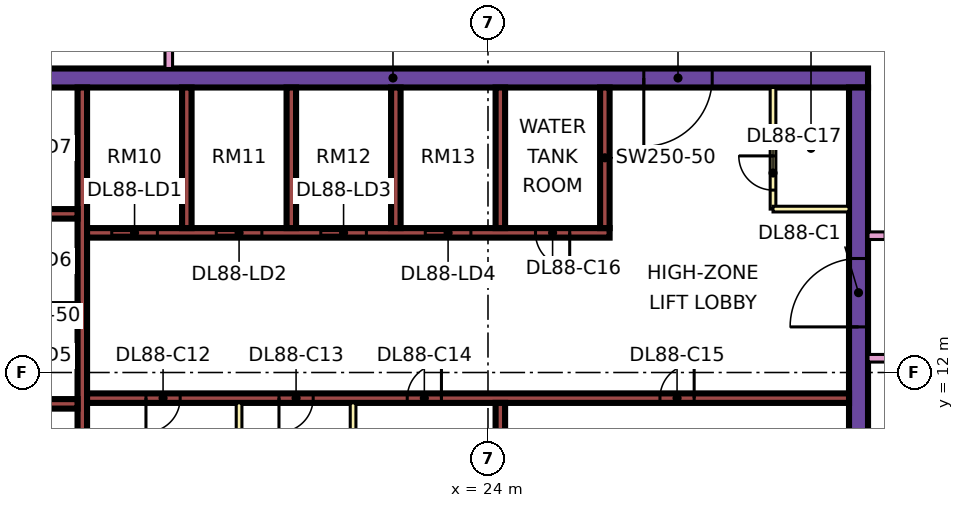
"""IFC4 building model, lengths in metres.
Left out: names, types, materials, properties, quantities, classifications, styles, units other than length and angle.
Written with IfcOpenShell. Run it as: python <this file> out.ifc"""

import sys

from ifc_helpers import new_model, si_unit, direction, frame, frame_2d, origin, place, context, subcontext, project, spatial, rectangle, extrude, element, fill, save


model = new_model("IFC4")
c1 = context("Model", 3, precision=1e-05, world=origin(), true_north=direction((0.0, 1.0)))
c2 = subcontext(c1, "Body", "Model", "MODEL_VIEW")
j1 = project(units=[si_unit("LENGTHUNIT", "METRE"), si_unit("PLANEANGLEUNIT", "RADIAN")], contexts=[c1])
p1 = place(None, origin())
s1 = spatial("IfcSite", under=j1, at=p1, CompositionType="ELEMENT")
p2 = place(p1, origin())
s2 = spatial("IfcBuilding", under=s1, at=p2, CompositionType="ELEMENT")
p3 = place(p2, frame((0.0, 0.0, 376.4)))
s3 = spatial("IfcBuildingStorey", under=s2, at=p3, CompositionType="ELEMENT", Elevation=376.4)
p4 = place(p3, frame((9.0, 19.75, 0.0), z_axis=(0.0, 0.0, 1.0), x_axis=(1.0, 0.0, 0.0)))
e1 = element("IfcWall", 1, at=p4, inside=s3, PredefinedType="SHEAR", context=c2, shape_type="SweptSolid", body=[
    extrude(rectangle(XDim=25.0, YDim=0.5, at=frame_2d((12.5, 0.0))), origin(), (0.0, 0.0, 1.0), 3.75),
])
p5 = place(p4, frame((19.1, 0.0, 0.0)))
e2 = element("IfcOpeningElement", 2, at=p5, cuts=e1, PredefinedType="OPENING", context=c2, shape_type="SweptSolid", body=[
    extrude(rectangle(XDim=1.8, YDim=2.4, at=frame_2d((0.9, 1.2))), frame((0.0, 0.26, 0.0), z_axis=(0.0, -1.0, 0.0), x_axis=(1.0, 0.0, 0.0)), (0.0, 0.0, 1.0), 0.52),
])
p6 = place(p3, frame((33.75, 7.5, 0.0), z_axis=(0.0, 0.0, 1.0), x_axis=(0.0, 1.0, 0.0)))
e3 = element("IfcWall", 3, at=p6, inside=s3, PredefinedType="SHEAR", context=c2, shape_type="SweptSolid", body=[
    extrude(rectangle(XDim=12.0, YDim=0.5, at=frame_2d((6.0, 0.0))), origin(), (0.0, 0.0, 1.0), 3.75),
])
p7 = place(p6, frame((5.7, 0.0, 0.0)))
e4 = element("IfcOpeningElement", 4, at=p7, cuts=e3, PredefinedType="OPENING", context=c2, shape_type="SweptSolid", body=[
    extrude(rectangle(XDim=1.8, YDim=2.4, at=frame_2d((0.9, 1.2))), frame((0.0, 0.26, 0.0), z_axis=(0.0, -1.0, 0.0), x_axis=(1.0, 0.0, 0.0)), (0.0, 0.0, 1.0), 0.52),
])
p8 = place(p3, frame((13.325, 7.5, 0.0), z_axis=(0.0, 0.0, 1.0), x_axis=(0.0, 1.0, 0.0)))
e5 = element("IfcWall", 5, at=p8, inside=s3, PredefinedType="SHEAR", context=c2, shape_type="SweptSolid", body=[
    extrude(rectangle(XDim=12.0, YDim=0.25, at=frame_2d((6.0, 0.0))), origin(), (0.0, 0.0, 1.0), 3.75),
])
p9 = place(p3, frame((13.45, 11.325, 0.0), z_axis=(0.0, 0.0, 1.0), x_axis=(1.0, 0.0, 0.0)))
e6 = element("IfcWall", 6, at=p9, inside=s3, PredefinedType="SHEAR", context=c2, shape_type="SweptSolid", body=[
    extrude(rectangle(XDim=20.05, YDim=0.25, at=frame_2d((10.025, 0.0))), origin(), (0.0, 0.0, 1.0), 3.75),
])
p10 = place(p9, frame((1.55, 0.0, 0.0)))
e7 = element("IfcOpeningElement", 7, at=p10, cuts=e6, PredefinedType="OPENING", context=c2, shape_type="SweptSolid", body=[
    extrude(rectangle(XDim=0.9, YDim=2.1, at=frame_2d((0.45, 1.05))), frame((0.0, 0.135, 0.0), z_axis=(0.0, -1.0, 0.0), x_axis=(1.0, 0.0, 0.0)), (0.0, 0.0, 1.0), 0.27),
])
p11 = place(p9, frame((5.05, 0.0, 0.0)))
e8 = element("IfcOpeningElement", 8, at=p11, cuts=e6, PredefinedType="OPENING", context=c2, shape_type="SweptSolid", body=[
    extrude(rectangle(XDim=0.9, YDim=2.1, at=frame_2d((0.45, 1.05))), frame((0.0, 0.135, 0.0), z_axis=(0.0, -1.0, 0.0), x_axis=(1.0, 0.0, 0.0)), (0.0, 0.0, 1.0), 0.27),
])
p12 = place(p9, frame((8.425, 0.0, 0.0)))
e9 = element("IfcOpeningElement", 9, at=p12, cuts=e6, PredefinedType="OPENING", context=c2, shape_type="SweptSolid", body=[
    extrude(rectangle(XDim=0.9, YDim=2.1, at=frame_2d((0.45, 1.05))), frame((0.0, 0.135, 0.0), z_axis=(0.0, -1.0, 0.0), x_axis=(1.0, 0.0, 0.0)), (0.0, 0.0, 1.0), 0.27),
])
p13 = place(p9, frame((15.075, 0.0, 0.0)))
e10 = element("IfcOpeningElement", 10, at=p13, cuts=e6, PredefinedType="OPENING", context=c2, shape_type="SweptSolid", body=[
    extrude(rectangle(XDim=0.9, YDim=2.1, at=frame_2d((0.45, 1.05))), frame((0.0, 0.135, 0.0), z_axis=(0.0, -1.0, 0.0), x_axis=(1.0, 0.0, 0.0)), (0.0, 0.0, 1.0), 0.27),
])
p14 = place(p3, frame((13.45, 15.675, 0.0), z_axis=(0.0, 0.0, 1.0), x_axis=(1.0, 0.0, 0.0)))
e11 = element("IfcWall", 11, at=p14, inside=s3, PredefinedType="SHEAR", context=c2, shape_type="SweptSolid", body=[
    extrude(rectangle(XDim=13.75, YDim=0.25, at=frame_2d((6.875, 0.0))), origin(), (0.0, 0.0, 1.0), 3.75),
])
p15 = place(p14, frame((0.65, 0.0, 0.0)))
e12 = element("IfcOpeningElement", 12, at=p15, cuts=e11, PredefinedType="OPENING", context=c2, shape_type="SweptSolid", body=[
    extrude(rectangle(XDim=1.2, YDim=2.2, at=frame_2d((0.6, 1.1))), frame((0.0, 0.135, 0.0), z_axis=(0.0, -1.0, 0.0), x_axis=(1.0, 0.0, 0.0)), (0.0, 0.0, 1.0), 0.27),
])
p16 = place(p14, frame((3.4, 0.0, 0.0)))
e13 = element("IfcOpeningElement", 13, at=p16, cuts=e11, PredefinedType="OPENING", context=c2, shape_type="SweptSolid", body=[
    extrude(rectangle(XDim=1.2, YDim=2.2, at=frame_2d((0.6, 1.1))), frame((0.0, 0.135, 0.0), z_axis=(0.0, -1.0, 0.0), x_axis=(1.0, 0.0, 0.0)), (0.0, 0.0, 1.0), 0.27),
])
p17 = place(p14, frame((6.15, 0.0, 0.0)))
e14 = element("IfcOpeningElement", 14, at=p17, cuts=e11, PredefinedType="OPENING", context=c2, shape_type="SweptSolid", body=[
    extrude(rectangle(XDim=1.2, YDim=2.2, at=frame_2d((0.6, 1.1))), frame((0.0, 0.135, 0.0), z_axis=(0.0, -1.0, 0.0), x_axis=(1.0, 0.0, 0.0)), (0.0, 0.0, 1.0), 0.27),
])
p18 = place(p14, frame((8.9, 0.0, 0.0)))
e15 = element("IfcOpeningElement", 15, at=p18, cuts=e11, PredefinedType="OPENING", context=c2, shape_type="SweptSolid", body=[
    extrude(rectangle(XDim=1.2, YDim=2.2, at=frame_2d((0.6, 1.1))), frame((0.0, 0.135, 0.0), z_axis=(0.0, -1.0, 0.0), x_axis=(1.0, 0.0, 0.0)), (0.0, 0.0, 1.0), 0.27),
])
p19 = place(p14, frame((11.8, 0.0, 0.0)))
e16 = element("IfcOpeningElement", 16, at=p19, cuts=e11, PredefinedType="OPENING", context=c2, shape_type="SweptSolid", body=[
    extrude(rectangle(XDim=0.9, YDim=2.1, at=frame_2d((0.45, 1.05))), frame((0.0, 0.135, 0.0), z_axis=(0.0, -1.0, 0.0), x_axis=(1.0, 0.0, 0.0)), (0.0, 0.0, 1.0), 0.27),
])
for number, where, z_axis, x_axis in (
    (17, (10.2, 11.175, 0.0), (0.0, 0.0, 1.0), (1.0, 0.0, 0.0)),
    (18, (10.2, 13.675, 0.0), (0.0, 0.0, 1.0), (1.0, 0.0, 0.0)),
    (19, (10.2, 16.175, 0.0), (0.0, 0.0, 1.0), (1.0, 0.0, 0.0)),
):
    element("IfcWall", number, at=place(p3, frame(where, z_axis=z_axis, x_axis=x_axis)), inside=s3, PredefinedType="SHEAR", context=c2, shape_type="SweptSolid", body=[
        extrude(rectangle(XDim=3.0, YDim=0.25, at=frame_2d((1.5, 0.0))), origin(), (0.0, 0.0, 1.0), 3.75),
    ])
for number, where, z_axis, x_axis in (
    (20, (24.325, 7.5, 0.0), (0.0, 0.0, 1.0), (0.0, 1.0, 0.0)),
    (21, (16.075, 15.8, 0.0), (0.0, 0.0, 1.0), (0.0, 1.0, 0.0)),
    (22, (18.825, 15.8, 0.0), (0.0, 0.0, 1.0), (0.0, 1.0, 0.0)),
    (23, (21.575, 15.8, 0.0), (0.0, 0.0, 1.0), (0.0, 1.0, 0.0)),
    (24, (24.325, 15.8, 0.0), (0.0, 0.0, 1.0), (0.0, 1.0, 0.0)),
    (25, (27.075, 15.8, 0.0), (0.0, 0.0, 1.0), (0.0, 1.0, 0.0)),
):
    element("IfcWall", number, at=place(p3, frame(where, z_axis=z_axis, x_axis=x_axis)), inside=s3, PredefinedType="SHEAR", context=c2, shape_type="SweptSolid", body=[
        extrude(rectangle(XDim=3.7, YDim=0.25, at=frame_2d((1.85, 0.0))), origin(), (0.0, 0.0, 1.0), 3.75),
    ])
p20 = place(p3, frame((-1.447, 12.553, 0.0), z_axis=(0.0, 0.0, 1.0), x_axis=(0.707106781187, -0.707106781187, 0.0)))
e26 = element("IfcWall", 26, at=p20, inside=s3, PredefinedType="SOLIDWALL", context=c2, shape_type="SweptSolid", body=[
    extrude(rectangle(XDim=19.799, YDim=0.15, at=frame_2d((9.899, 0.0))), origin(), (0.0, 0.0, 1.0), 3.35),
])
p21 = place(p20, frame((2.212, 0.0, 0.45)))
e27 = element("IfcOpeningElement", 27, at=p21, cuts=e26, PredefinedType="OPENING", context=c2, shape_type="SweptSolid", body=[
    extrude(rectangle(XDim=3.0, YDim=2.4, at=frame_2d((1.5, 1.2))), frame((0.0, 0.085, 0.0), z_axis=(0.0, -1.0, 0.0), x_axis=(1.0, 0.0, 0.0)), (0.0, 0.0, 1.0), 0.17),
])
p22 = place(p20, frame((10.216, 0.0, 0.45)))
e28 = element("IfcOpeningElement", 28, at=p22, cuts=e26, PredefinedType="OPENING", context=c2, shape_type="SweptSolid", body=[
    extrude(rectangle(XDim=3.0, YDim=2.4, at=frame_2d((1.5, 1.2))), frame((0.0, 0.085, 0.0), z_axis=(0.0, -1.0, 0.0), x_axis=(1.0, 0.0, 0.0)), (0.0, 0.0, 1.0), 0.17),
])
for number, where, z_axis, x_axis in (
    (29, (17.45, 7.5, 0.0), (0.0, 0.0, 1.0), (0.0, 1.0, 0.0)),
    (30, (20.45, 7.5, 0.0), (0.0, 0.0, 1.0), (0.0, 1.0, 0.0)),
):
    element("IfcWall", number, at=place(p3, frame(where, z_axis=z_axis, x_axis=x_axis)), inside=s3, PredefinedType="PARTITIONING", context=c2, shape_type="SweptSolid", body=[
        extrude(rectangle(XDim=3.7, YDim=0.15, at=frame_2d((1.85, 0.0))), origin(), (0.0, 0.0, 1.0), 3.35),
    ])
p23 = place(p3, frame((31.5, 16.3, 0.0), z_axis=(0.0, 0.0, 1.0), x_axis=(0.0, 1.0, 0.0)))
e31 = element("IfcWall", 31, at=p23, inside=s3, PredefinedType="PARTITIONING", context=c2, shape_type="SweptSolid", body=[
    extrude(rectangle(XDim=3.2, YDim=0.15, at=frame_2d((1.6, 0.0))), origin(), (0.0, 0.0, 1.0), 3.35),
])
p24 = place(p23, frame((0.5, 0.0, 0.0)))
e32 = element("IfcOpeningElement", 32, at=p24, cuts=e31, PredefinedType="OPENING", context=c2, shape_type="SweptSolid", body=[
    extrude(rectangle(XDim=0.9, YDim=2.1, at=frame_2d((0.45, 1.05))), frame((0.0, 0.085, 0.0), z_axis=(0.0, -1.0, 0.0), x_axis=(1.0, 0.0, 0.0)), (0.0, 0.0, 1.0), 0.17),
])
p25 = place(p3, frame((31.5, 16.3, 0.0), z_axis=(0.0, 0.0, 1.0), x_axis=(1.0, 0.0, 0.0)))
e33 = element("IfcWall", 33, at=p25, inside=s3, PredefinedType="PARTITIONING", context=c2, shape_type="SweptSolid", body=[
    extrude(rectangle(XDim=2.0, YDim=0.15, at=frame_2d((1.0, 0.0))), origin(), (0.0, 0.0, 1.0), 3.35),
])
p26 = place(p3, frame((15.6, 20.0, 0.0), z_axis=(0.0, 0.0, 1.0), x_axis=(0.0, 1.0, 0.0)))
e34 = element("IfcWall", 34, at=p26, inside=s3, PredefinedType="PARTITIONING", context=c2, shape_type="SweptSolid", body=[
    extrude(rectangle(XDim=27.775, YDim=0.2, at=frame_2d((13.887, 0.0))), origin(), (0.0, 0.0, 1.0), 3.35),
])
p27 = place(p26, frame((7.15, 0.0, 0.0)))
e35 = element("IfcOpeningElement", 35, at=p27, cuts=e34, PredefinedType="OPENING", context=c2, shape_type="SweptSolid", body=[
    extrude(rectangle(XDim=1.6, YDim=2.1, at=frame_2d((0.8, 1.05))), frame((0.0, 0.11, 0.0), z_axis=(0.0, -1.0, 0.0), x_axis=(1.0, 0.0, 0.0)), (0.0, 0.0, 1.0), 0.22),
])
p28 = place(p26, frame((13.5, 0.0, 0.0)))
e36 = element("IfcOpeningElement", 36, at=p28, cuts=e34, PredefinedType="OPENING", context=c2, shape_type="SweptSolid", body=[
    extrude(rectangle(XDim=1.0, YDim=2.1, at=frame_2d((0.5, 1.05))), frame((0.0, 0.11, 0.0), z_axis=(0.0, -1.0, 0.0), x_axis=(1.0, 0.0, 0.0)), (0.0, 0.0, 1.0), 0.22),
])
p29 = place(p26, frame((22.9, 0.0, 0.0)))
e37 = element("IfcOpeningElement", 37, at=p29, cuts=e34, PredefinedType="OPENING", context=c2, shape_type="SweptSolid", body=[
    extrude(rectangle(XDim=1.0, YDim=2.1, at=frame_2d((0.5, 1.05))), frame((0.0, 0.11, 0.0), z_axis=(0.0, -1.0, 0.0), x_axis=(1.0, 0.0, 0.0)), (0.0, 0.0, 1.0), 0.22),
])
p30 = place(p26, frame((1.15, 0.0, 0.0)))
e38 = element("IfcOpeningElement", 38, at=p30, cuts=e34, PredefinedType="OPENING", context=c2, shape_type="SweptSolid", body=[
    extrude(rectangle(XDim=1.8, YDim=2.1, at=frame_2d((0.9, 1.05))), frame((0.0, 0.11, 0.0), z_axis=(0.0, -1.0, 0.0), x_axis=(1.0, 0.0, 0.0)), (0.0, 0.0, 1.0), 0.22),
])
p31 = place(p26, frame((25.9, 0.0, 0.0)))
e39 = element("IfcOpeningElement", 39, at=p31, cuts=e34, PredefinedType="OPENING", context=c2, shape_type="SweptSolid", body=[
    extrude(rectangle(XDim=1.0, YDim=2.1, at=frame_2d((0.5, 1.05))), frame((0.0, 0.11, 0.0), z_axis=(0.0, -1.0, 0.0), x_axis=(1.0, 0.0, 0.0)), (0.0, 0.0, 1.0), 0.22),
])
p32 = place(p3, frame((34.0, 12.375, 0.0), z_axis=(0.0, 0.0, 1.0), x_axis=(1.0, 0.0, 0.0)))
e40 = element("IfcWall", 40, at=p32, inside=s3, PredefinedType="PARTITIONING", context=c2, shape_type="SweptSolid", body=[
    extrude(rectangle(XDim=2.376, YDim=0.2, at=frame_2d((1.188, 0.0))), origin(), (0.0, 0.0, 1.0), 3.35),
])
p33 = place(p3, frame((34.0, 15.6, 0.0), z_axis=(0.0, 0.0, 1.0), x_axis=(1.0, 0.0, 0.0)))
e41 = element("IfcWall", 41, at=p33, inside=s3, PredefinedType="PARTITIONING", context=c2, shape_type="SweptSolid", body=[
    extrude(rectangle(XDim=10.35, YDim=0.2, at=frame_2d((5.175, 0.0))), origin(), (0.0, 0.0, 1.0), 3.35),
])
p34 = place(p33, frame((5.6, 0.0, 0.0)))
e42 = element("IfcOpeningElement", 42, at=p34, cuts=e41, PredefinedType="OPENING", context=c2, shape_type="SweptSolid", body=[
    extrude(rectangle(XDim=1.0, YDim=2.1, at=frame_2d((0.5, 1.05))), frame((0.0, 0.11, 0.0), z_axis=(0.0, -1.0, 0.0), x_axis=(1.0, 0.0, 0.0)), (0.0, 0.0, 1.0), 0.22),
])
p35 = place(p33, frame((0.45, 0.0, 0.0)))
e43 = element("IfcOpeningElement", 43, at=p35, cuts=e41, PredefinedType="OPENING", context=c2, shape_type="SweptSolid", body=[
    extrude(rectangle(XDim=1.2, YDim=2.1, at=frame_2d((0.6, 1.05))), frame((0.0, 0.11, 0.0), z_axis=(0.0, -1.0, 0.0), x_axis=(1.0, 0.0, 0.0)), (0.0, 0.0, 1.0), 0.22),
])
p36 = place(p15, origin())
e44 = element("IfcDoor", 44, at=p36, inside=s3, OperationType="DOUBLE_DOOR_SLIDING", PredefinedType="DOOR", context=c2, shape_type="SweptSolid", body=[
    extrude(rectangle(XDim=1.2, YDim=2.2, at=frame_2d((0.6, 1.1))), frame((0.0, 0.025, 0.0), z_axis=(0.0, -1.0, 0.0), x_axis=(1.0, 0.0, 0.0)), (0.0, 0.0, 1.0), 0.05),
])
fill(e12, e44)
p37 = place(p16, origin())
e45 = element("IfcDoor", 45, at=p37, inside=s3, OperationType="DOUBLE_DOOR_SLIDING", PredefinedType="DOOR", context=c2, shape_type="SweptSolid", body=[
    extrude(rectangle(XDim=1.2, YDim=2.2, at=frame_2d((0.6, 1.1))), frame((0.0, 0.025, 0.0), z_axis=(0.0, -1.0, 0.0), x_axis=(1.0, 0.0, 0.0)), (0.0, 0.0, 1.0), 0.05),
])
fill(e13, e45)
p38 = place(p17, origin())
e46 = element("IfcDoor", 46, at=p38, inside=s3, OperationType="DOUBLE_DOOR_SLIDING", PredefinedType="DOOR", context=c2, shape_type="SweptSolid", body=[
    extrude(rectangle(XDim=1.2, YDim=2.2, at=frame_2d((0.6, 1.1))), frame((0.0, 0.025, 0.0), z_axis=(0.0, -1.0, 0.0), x_axis=(1.0, 0.0, 0.0)), (0.0, 0.0, 1.0), 0.05),
])
fill(e14, e46)
p39 = place(p18, origin())
e47 = element("IfcDoor", 47, at=p39, inside=s3, OperationType="DOUBLE_DOOR_SLIDING", PredefinedType="DOOR", context=c2, shape_type="SweptSolid", body=[
    extrude(rectangle(XDim=1.2, YDim=2.2, at=frame_2d((0.6, 1.1))), frame((0.0, 0.025, 0.0), z_axis=(0.0, -1.0, 0.0), x_axis=(1.0, 0.0, 0.0)), (0.0, 0.0, 1.0), 0.05),
])
fill(e15, e47)
p40 = place(p7, origin())
e48 = element("IfcDoor", 48, at=p40, inside=s3, OperationType="DOUBLE_DOOR_SINGLE_SWING", PredefinedType="DOOR", context=c2, shape_type="SweptSolid", body=[
    extrude(rectangle(XDim=1.8, YDim=2.4, at=frame_2d((0.9, 1.2))), frame((0.0, 0.025, 0.0), z_axis=(0.0, -1.0, 0.0), x_axis=(1.0, 0.0, 0.0)), (0.0, 0.0, 1.0), 0.05),
])
fill(e4, e48)
p41 = place(p5, frame((1.8, 0.0, 0.0), z_axis=(0.0, 0.0, 1.0), x_axis=(-1.0, 0.0, 0.0)))
e49 = element("IfcDoor", 49, at=p41, inside=s3, OperationType="DOUBLE_DOOR_SINGLE_SWING", PredefinedType="DOOR", context=c2, shape_type="SweptSolid", body=[
    extrude(rectangle(XDim=1.8, YDim=2.4, at=frame_2d((0.9, 1.2))), frame((0.0, 0.025, 0.0), z_axis=(0.0, -1.0, 0.0), x_axis=(1.0, 0.0, 0.0)), (0.0, 0.0, 1.0), 0.05),
])
fill(e2, e49)
p42 = place(p10, frame((0.9, 0.0, 0.0), z_axis=(0.0, 0.0, 1.0), x_axis=(-1.0, 0.0, 0.0)))
e50 = element("IfcDoor", 50, at=p42, inside=s3, OperationType="SINGLE_SWING_LEFT", PredefinedType="DOOR", context=c2, shape_type="SweptSolid", body=[
    extrude(rectangle(XDim=0.9, YDim=2.1, at=frame_2d((0.45, 1.05))), frame((0.0, 0.025, 0.0), z_axis=(0.0, -1.0, 0.0), x_axis=(1.0, 0.0, 0.0)), (0.0, 0.0, 1.0), 0.05),
])
fill(e7, e50)
p43 = place(p11, frame((0.9, 0.0, 0.0), z_axis=(0.0, 0.0, 1.0), x_axis=(-1.0, 0.0, 0.0)))
e51 = element("IfcDoor", 51, at=p43, inside=s3, OperationType="SINGLE_SWING_LEFT", PredefinedType="DOOR", context=c2, shape_type="SweptSolid", body=[
    extrude(rectangle(XDim=0.9, YDim=2.1, at=frame_2d((0.45, 1.05))), frame((0.0, 0.025, 0.0), z_axis=(0.0, -1.0, 0.0), x_axis=(1.0, 0.0, 0.0)), (0.0, 0.0, 1.0), 0.05),
])
fill(e8, e51)
p44 = place(p12, frame((0.9, 0.0, 0.0), z_axis=(0.0, 0.0, 1.0), x_axis=(-1.0, 0.0, 0.0)))
e52 = element("IfcDoor", 52, at=p44, inside=s3, OperationType="SINGLE_SWING_RIGHT", PredefinedType="DOOR", context=c2, shape_type="SweptSolid", body=[
    extrude(rectangle(XDim=0.9, YDim=2.1, at=frame_2d((0.45, 1.05))), frame((0.0, 0.025, 0.0), z_axis=(0.0, -1.0, 0.0), x_axis=(1.0, 0.0, 0.0)), (0.0, 0.0, 1.0), 0.05),
])
fill(e9, e52)
p45 = place(p13, frame((0.9, 0.0, 0.0), z_axis=(0.0, 0.0, 1.0), x_axis=(-1.0, 0.0, 0.0)))
e53 = element("IfcDoor", 53, at=p45, inside=s3, OperationType="SINGLE_SWING_RIGHT", PredefinedType="DOOR", context=c2, shape_type="SweptSolid", body=[
    extrude(rectangle(XDim=0.9, YDim=2.1, at=frame_2d((0.45, 1.05))), frame((0.0, 0.025, 0.0), z_axis=(0.0, -1.0, 0.0), x_axis=(1.0, 0.0, 0.0)), (0.0, 0.0, 1.0), 0.05),
])
fill(e10, e53)
p46 = place(p19, origin())
e54 = element("IfcDoor", 54, at=p46, inside=s3, OperationType="SINGLE_SWING_RIGHT", PredefinedType="DOOR", context=c2, shape_type="SweptSolid", body=[
    extrude(rectangle(XDim=0.9, YDim=2.1, at=frame_2d((0.45, 1.05))), frame((0.0, 0.025, 0.0), z_axis=(0.0, -1.0, 0.0), x_axis=(1.0, 0.0, 0.0)), (0.0, 0.0, 1.0), 0.05),
])
fill(e16, e54)
p47 = place(p24, frame((0.9, 0.0, 0.0), z_axis=(0.0, 0.0, 1.0), x_axis=(-1.0, 0.0, 0.0)))
e55 = element("IfcDoor", 55, at=p47, inside=s3, OperationType="SINGLE_SWING_RIGHT", PredefinedType="DOOR", context=c2, shape_type="SweptSolid", body=[
    extrude(rectangle(XDim=0.9, YDim=2.1, at=frame_2d((0.45, 1.05))), frame((0.0, 0.025, 0.0), z_axis=(0.0, -1.0, 0.0), x_axis=(1.0, 0.0, 0.0)), (0.0, 0.0, 1.0), 0.05),
])
fill(e32, e55)
save(model, sys.argv[1])
